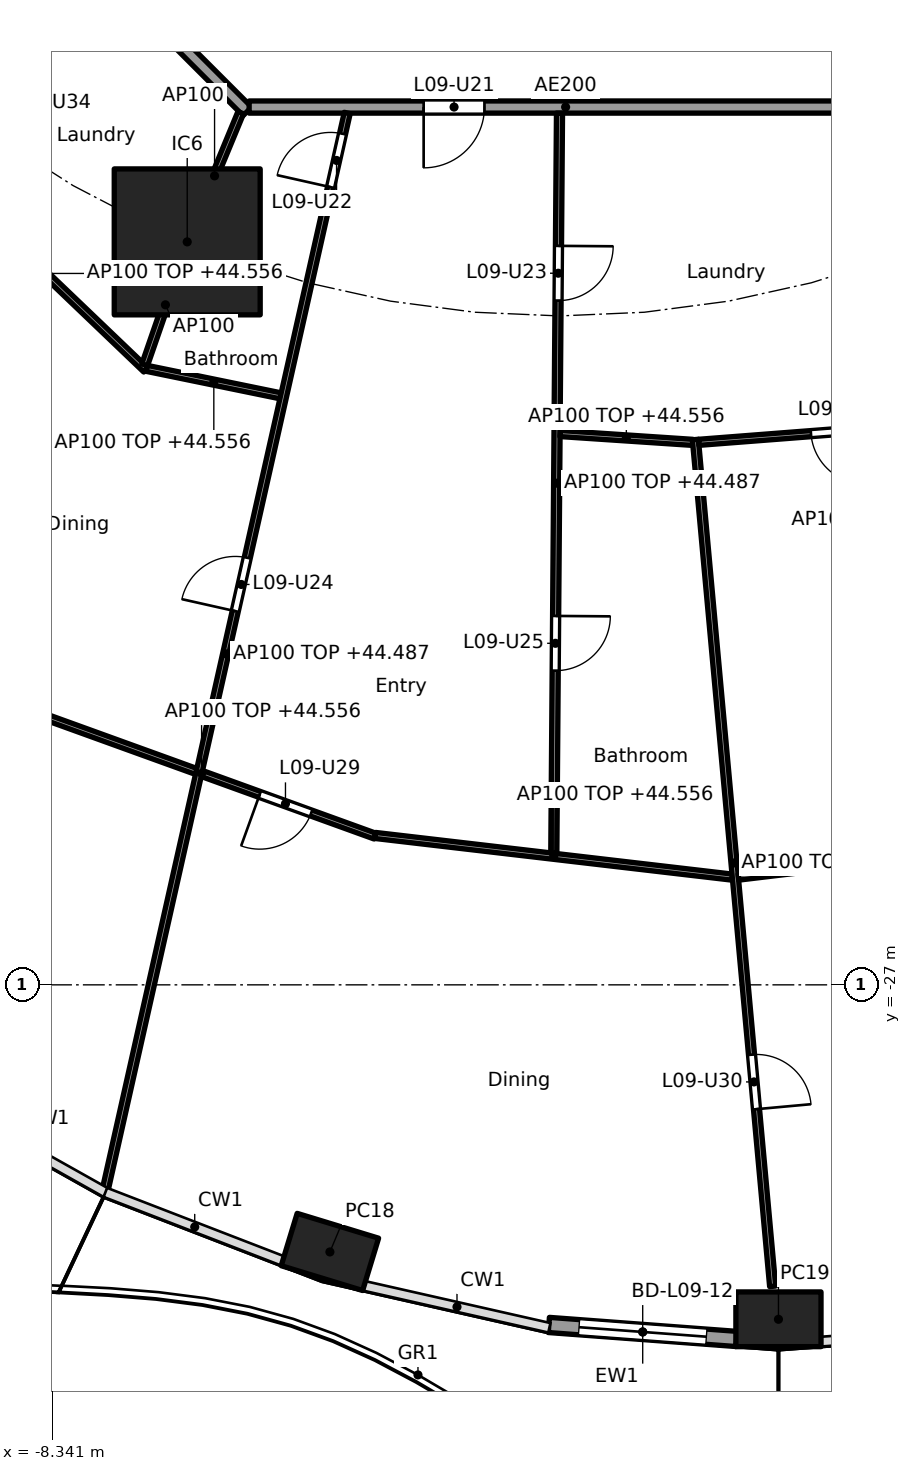
"""IFC4 building model, lengths in metres.
Left out: names, types, materials, properties, quantities, classifications, styles, units other than length and angle.
Written with IfcOpenShell. Run it as: python <this file> out.ifc"""

import sys

from ifc_helpers import new_model, si_unit, direction, frame, frame_2d, origin, origin_2d, place, context, subcontext, project, spatial, rectangle, hollow_rectangle, extrude, element, fill, save


model = new_model("IFC4")
c1 = context("Model", 3, precision=1e-05, world=origin(), true_north=direction((0.0, 1.0)))
c2 = subcontext(c1, "Body", "Model", "MODEL_VIEW")
j1 = project(units=[si_unit("LENGTHUNIT", "METRE"), si_unit("PLANEANGLEUNIT", "RADIAN")], contexts=[c1])
p1 = place(None, origin())
s1 = spatial("IfcSite", under=j1, at=p1, CompositionType="ELEMENT")
p2 = place(p1, origin())
s2 = spatial("IfcBuilding", under=s1, at=p2, CompositionType="ELEMENT")
p3 = place(p2, frame((0.0, 0.0, 41.8)))
s3 = spatial("IfcBuildingStorey", under=s2, at=p3, CompositionType="ELEMENT", Elevation=41.8)
for number, where, z_axis, x_axis in (
    (1, (-3.776, -31.393, 0.0), (0.0, 0.0, 1.0), (0.957, -0.292, 0.0)),
    (2, (3.6, -32.5, 0.0), (0.0, 0.0, 1.0), (1.0, 0.0, 0.0)),
):
    element("IfcColumn", number, at=place(p3, frame(where, z_axis=z_axis, x_axis=x_axis)), inside=s3, PredefinedType="COLUMN", context=c2, shape_type="SweptSolid", body=[
        extrude(hollow_rectangle(XDim=1.4, YDim=0.9, WallThickness=0.05, at=origin_2d()), origin(), (0.0, 0.0, 1.0), 3.7),
    ])
p4 = place(p3, frame((-6.123, -14.782, 0.0), z_axis=(0.0, 0.0, 1.0), x_axis=(1.0, 0.0, 0.0)))
e3 = element("IfcColumn", 3, at=p4, inside=s3, PredefinedType="COLUMN", context=c2, shape_type="SweptSolid", body=[
    extrude(rectangle(XDim=2.4, YDim=2.4, at=origin_2d()), origin(), (0.0, 0.0, 1.0), 3.7),
])
p5 = place(p3, frame((2.911, -32.823, 0.0), z_axis=(0.0, 0.0, 1.0), x_axis=(-0.997230834878, 0.074368420505, 0.0)))
e4 = element("IfcWall", 4, at=p5, inside=s3, PredefinedType="SOLIDWALL", context=c2, shape_type="SweptSolid", body=[
    extrude(rectangle(XDim=3.096, YDim=0.25, at=frame_2d((1.548, 0.0))), origin(), (0.0, 0.0, 1.0), 3.44),
])
p6 = place(p5, frame((0.498, 0.0, 0.0)))
e5 = element("IfcOpeningElement", 5, at=p6, cuts=e4, PredefinedType="OPENING", context=c2, shape_type="SweptSolid", body=[
    extrude(rectangle(XDim=2.1, YDim=2.4, at=frame_2d((1.05, 1.2))), frame((0.0, 0.135, 0.0), z_axis=(0.0, -1.0, 0.0), x_axis=(1.0, 0.0, 0.0)), (0.0, 0.0, 1.0), 0.27),
])
p7 = place(p3, frame((-12.635, -5.134, 0.0), z_axis=(0.0, 0.0, 1.0), x_axis=(0.707106781187, -0.707106781187, 0.0)))
e6 = element("IfcWall", 6, at=p7, inside=s3, PredefinedType="PARTITIONING", context=c2, shape_type="SweptSolid", body=[
    extrude(rectangle(XDim=10.609, YDim=0.2, at=frame_2d((5.305, 0.0))), origin(), (0.0, 0.0, 1.0), 3.44),
])
p8 = place(p3, frame((-5.104, -12.565, 0.0), z_axis=(0.0, 0.0, 1.0), x_axis=(1.0, 0.0, 0.0)))
e7 = element("IfcWall", 7, at=p8, inside=s3, PredefinedType="PARTITIONING", context=c2, shape_type="SweptSolid", body=[
    extrude(rectangle(XDim=10.409, YDim=0.2, at=frame_2d((5.205, 0.0))), origin(), (0.0, 0.0, 1.0), 3.44),
])
p9 = place(p8, frame((2.87, 0.0, 0.0)))
e8 = element("IfcOpeningElement", 8, at=p9, cuts=e7, PredefinedType="OPENING", context=c2, shape_type="SweptSolid", body=[
    extrude(rectangle(XDim=1.0, YDim=2.1, at=frame_2d((0.5, 1.05))), frame((0.0, 0.11, 0.0), z_axis=(0.0, -1.0, 0.0), x_axis=(1.0, 0.0, 0.0)), (0.0, 0.0, 1.0), 0.22),
])
p10 = place(p3, frame((-7.715, -10.193, 0.0), z_axis=(0.0, 0.0, 1.0), x_axis=(-0.573126502256, -0.819466907454, 0.0)))
e9 = element("IfcWall", 9, at=p10, inside=s3, PredefinedType="PARTITIONING", context=c2, shape_type="SweptSolid", body=[
    extrude(rectangle(XDim=9.954, YDim=0.1, at=frame_2d((4.977, 0.0))), origin(), (0.0, 0.0, 1.0), 2.687),
])
p11 = place(p10, frame((6.631, 0.0, 0.0)))
e10 = element("IfcOpeningElement", 10, at=p11, cuts=e9, PredefinedType="OPENING", context=c2, shape_type="SweptSolid", body=[
    extrude(rectangle(XDim=0.9, YDim=2.1, at=frame_2d((0.45, 1.05))), frame((0.0, 0.06, 0.0), z_axis=(0.0, -1.0, 0.0), x_axis=(1.0, 0.0, 0.0)), (0.0, 0.0, 1.0), 0.12),
])
p12 = place(p10, frame((1.678, 0.0, 0.0)))
e11 = element("IfcOpeningElement", 11, at=p12, cuts=e9, PredefinedType="OPENING", context=c2, shape_type="SweptSolid", body=[
    extrude(rectangle(XDim=0.9, YDim=2.1, at=frame_2d((0.45, 1.05))), frame((0.0, 0.06, 0.0), z_axis=(0.0, -1.0, 0.0), x_axis=(1.0, 0.0, 0.0)), (0.0, 0.0, 1.0), 0.12),
])
p13 = place(p3, frame((-10.119, -13.716, 0.0), z_axis=(0.0, 0.0, 1.0), x_axis=(0.722763212502, -0.69109575216, 0.0)))
e12 = element("IfcWall", 12, at=p13, inside=s3, PredefinedType="PARTITIONING", context=c2, shape_type="SweptSolid", body=[
    extrude(rectangle(XDim=4.587, YDim=0.1, at=frame_2d((2.293, 0.0))), origin(), (0.0, 0.0, 1.0), 2.756),
])
p14 = place(p13, frame((0.938, 0.0, 0.0)))
e13 = element("IfcOpeningElement", 13, at=p14, cuts=e12, PredefinedType="OPENING", context=c2, shape_type="SweptSolid", body=[
    extrude(rectangle(XDim=0.9, YDim=2.1, at=frame_2d((0.45, 1.05))), frame((0.0, 0.06, 0.0), z_axis=(0.0, -1.0, 0.0), x_axis=(1.0, 0.0, 0.0)), (0.0, 0.0, 1.0), 0.12),
])
p15 = place(p3, frame((-5.243, -12.657, 0.0), z_axis=(0.0, 0.0, 1.0), x_axis=(-0.382719158442, -0.923864733477, 0.0)))
e14 = element("IfcWall", 14, at=p15, inside=s3, PredefinedType="PARTITIONING", context=c2, shape_type="SweptSolid", body=[
    extrude(rectangle(XDim=2.25, YDim=0.1, at=frame_2d((1.125, 0.0))), origin(), (0.0, 0.0, 1.0), 3.44),
])
p16 = place(p3, frame((-6.139, -14.83, 0.0), z_axis=(0.0, 0.0, 1.0), x_axis=(-0.327246993321, -0.944938836837, 0.0)))
e15 = element("IfcWall", 15, at=p16, inside=s3, PredefinedType="PARTITIONING", context=c2, shape_type="SweptSolid", body=[
    extrude(rectangle(XDim=2.09, YDim=0.1, at=frame_2d((1.045, 0.0))), origin(), (0.0, 0.0, 1.0), 3.44),
])
p17 = place(p3, frame((-6.791, -16.862, 0.0), z_axis=(0.0, 0.0, 1.0), x_axis=(0.979581941859, -0.201045316246, 0.0)))
e16 = element("IfcWall", 16, at=p17, inside=s3, PredefinedType="PARTITIONING", context=c2, shape_type="SweptSolid", body=[
    extrude(rectangle(XDim=2.256, YDim=0.1, at=frame_2d((1.128, 0.0))), origin(), (0.0, 0.0, 1.0), 2.756),
])
p18 = place(p3, frame((-8.739, -22.491, 0.0), z_axis=(0.0, 0.0, 1.0), x_axis=(0.940401691072, -0.340065669288, 0.0)))
e17 = element("IfcWall", 17, at=p18, inside=s3, PredefinedType="PARTITIONING", context=c2, shape_type="SweptSolid", body=[
    extrude(rectangle(XDim=6.067, YDim=0.1, at=frame_2d((3.034, 0.0))), origin(), (0.0, 0.0, 1.0), 2.756),
])
p19 = place(p18, frame((4.05, 0.0, 0.0)))
e18 = element("IfcOpeningElement", 18, at=p19, cuts=e17, PredefinedType="OPENING", context=c2, shape_type="SweptSolid", body=[
    extrude(rectangle(XDim=0.9, YDim=2.1, at=frame_2d((0.45, 1.05))), frame((0.0, 0.06, 0.0), z_axis=(0.0, -1.0, 0.0), x_axis=(1.0, 0.0, 0.0)), (0.0, 0.0, 1.0), 0.12),
])
p20 = place(p3, frame((-3.492, -12.662, 0.0), z_axis=(0.0, 0.0, 1.0), x_axis=(-0.219268088006, -0.975664648115, 0.0)))
e19 = element("IfcWall", 19, at=p20, inside=s3, PredefinedType="PARTITIONING", context=c2, shape_type="SweptSolid", body=[
    extrude(rectangle(XDim=18.23, YDim=0.1, at=frame_2d((9.115, 0.0))), origin(), (0.0, 0.0, 1.0), 2.687),
])
p21 = place(p20, frame((0.35, 0.0, 0.0)))
e20 = element("IfcOpeningElement", 20, at=p21, cuts=e19, PredefinedType="OPENING", context=c2, shape_type="SweptSolid", body=[
    extrude(rectangle(XDim=0.9, YDim=2.1, at=frame_2d((0.45, 1.05))), frame((0.0, 0.06, 0.0), z_axis=(0.0, -1.0, 0.0), x_axis=(1.0, 0.0, 0.0)), (0.0, 0.0, 1.0), 0.12),
])
p22 = place(p20, frame((7.497, 0.0, 0.0)))
e21 = element("IfcOpeningElement", 21, at=p22, cuts=e19, PredefinedType="OPENING", context=c2, shape_type="SweptSolid", body=[
    extrude(rectangle(XDim=0.9, YDim=2.1, at=frame_2d((0.45, 1.05))), frame((0.0, 0.06, 0.0), z_axis=(0.0, -1.0, 0.0), x_axis=(1.0, 0.0, 0.0)), (0.0, 0.0, 1.0), 0.12),
])
p23 = place(p3, frame((-3.031, -24.543, 0.0), z_axis=(0.0, 0.0, 1.0), x_axis=(0.993255612046, -0.115945198862, 0.0)))
e22 = element("IfcWall", 22, at=p23, inside=s3, PredefinedType="PARTITIONING", context=c2, shape_type="SweptSolid", body=[
    extrude(rectangle(XDim=5.913, YDim=0.1, at=frame_2d((2.956, 0.0))), origin(), (0.0, 0.0, 1.0), 2.756),
])
p24 = place(p3, frame((-0.001, -12.665, 0.0), z_axis=(0.0, 0.0, 1.0), x_axis=(-0.007702417287, -0.999970335944, 0.0)))
e23 = element("IfcWall", 23, at=p24, inside=s3, PredefinedType="PARTITIONING", context=c2, shape_type="SweptSolid", body=[
    extrude(rectangle(XDim=12.171, YDim=0.1, at=frame_2d((6.086, 0.0))), origin(), (0.0, 0.0, 1.0), 2.687),
])
p25 = place(p24, frame((2.183, 0.0, 0.0)))
e24 = element("IfcOpeningElement", 24, at=p25, cuts=e23, PredefinedType="OPENING", context=c2, shape_type="SweptSolid", body=[
    extrude(rectangle(XDim=0.9, YDim=2.1, at=frame_2d((0.45, 1.05))), frame((0.0, 0.06, 0.0), z_axis=(0.0, -1.0, 0.0), x_axis=(1.0, 0.0, 0.0)), (0.0, 0.0, 1.0), 0.12),
])
p26 = place(p24, frame((8.269, 0.0, 0.0)))
e25 = element("IfcOpeningElement", 25, at=p26, cuts=e23, PredefinedType="OPENING", context=c2, shape_type="SweptSolid", body=[
    extrude(rectangle(XDim=0.9, YDim=2.1, at=frame_2d((0.45, 1.05))), frame((0.0, 0.06, 0.0), z_axis=(0.0, -1.0, 0.0), x_axis=(1.0, 0.0, 0.0)), (0.0, 0.0, 1.0), 0.12),
])
p27 = place(p3, frame((0.009, -17.934, 0.0), z_axis=(0.0, 0.0, 1.0), x_axis=(0.997794542617, -0.066378089183, 0.0)))
e26 = element("IfcWall", 26, at=p27, inside=s3, PredefinedType="PARTITIONING", context=c2, shape_type="SweptSolid", body=[
    extrude(rectangle(XDim=2.185, YDim=0.1, at=frame_2d((1.092, 0.0))), origin(), (0.0, 0.0, 1.0), 2.756),
])
p28 = place(p3, frame((2.234, -18.032, 0.0), z_axis=(0.0, 0.0, 1.0), x_axis=(0.090891502968, -0.995860800859, 0.0)))
e27 = element("IfcWall", 27, at=p28, inside=s3, PredefinedType="PARTITIONING", context=c2, shape_type="SweptSolid", body=[
    extrude(rectangle(XDim=13.984, YDim=0.1, at=frame_2d((6.992, 0.0))), origin(), (0.0, 0.0, 1.0), 2.756),
])
p29 = place(p28, frame((10.158, 0.0, 0.0)))
e28 = element("IfcOpeningElement", 28, at=p29, cuts=e27, PredefinedType="OPENING", context=c2, shape_type="SweptSolid", body=[
    extrude(rectangle(XDim=0.9, YDim=2.1, at=frame_2d((0.45, 1.05))), frame((0.0, 0.06, 0.0), z_axis=(0.0, -1.0, 0.0), x_axis=(1.0, 0.0, 0.0)), (0.0, 0.0, 1.0), 0.12),
])
p30 = place(p3, frame((2.288, -18.078, 0.0), z_axis=(0.0, 0.0, 1.0), x_axis=(0.99701850123, 0.077162868047, 0.0)))
e29 = element("IfcWall", 29, at=p30, inside=s3, PredefinedType="PARTITIONING", context=c2, shape_type="SweptSolid", body=[
    extrude(rectangle(XDim=4.604, YDim=0.1, at=frame_2d((2.302, 0.0))), origin(), (0.0, 0.0, 1.0), 2.756),
])
p31 = place(p30, frame((1.852, 0.0, 0.0)))
e30 = element("IfcOpeningElement", 30, at=p31, cuts=e29, PredefinedType="OPENING", context=c2, shape_type="SweptSolid", body=[
    extrude(rectangle(XDim=0.9, YDim=2.1, at=frame_2d((0.45, 1.05))), frame((0.0, 0.06, 0.0), z_axis=(0.0, -1.0, 0.0), x_axis=(1.0, 0.0, 0.0)), (0.0, 0.0, 1.0), 0.12),
])
p32 = place(p3, frame((2.941, -25.229, 0.0), z_axis=(0.0, 0.0, 1.0), x_axis=(0.992834127896, 0.119500604542, 0.0)))
e31 = element("IfcWall", 31, at=p32, inside=s3, PredefinedType="PARTITIONING", context=c2, shape_type="SweptSolid", body=[
    extrude(rectangle(XDim=5.959, YDim=0.1, at=frame_2d((2.98, 0.0))), origin(), (0.0, 0.0, 1.0), 2.756),
])
p33 = place(p6, origin())
e32 = element("IfcDoor", 32, at=p33, inside=s3, OperationType="SLIDING_TO_LEFT", PredefinedType="DOOR", context=c2, shape_type="SweptSolid", body=[
    extrude(rectangle(XDim=2.1, YDim=2.4, at=frame_2d((1.05, 1.2))), frame((0.0, 0.025, 0.0), z_axis=(0.0, -1.0, 0.0), x_axis=(1.0, 0.0, 0.0)), (0.0, 0.0, 1.0), 0.05),
])
fill(e5, e32)
p34 = place(p9, frame((1.0, 0.0, 0.0), x_axis=(-1.0, 0.0, 0.0)))
e33 = element("IfcDoor", 33, at=p34, inside=s3, OperationType="SINGLE_SWING_RIGHT", PredefinedType="DOOR", context=c2, shape_type="SweptSolid", body=[
    extrude(rectangle(XDim=1.0, YDim=2.1, at=frame_2d((0.5, 1.05))), frame((0.0, 0.025, 0.0), z_axis=(0.0, -1.0, 0.0), x_axis=(1.0, 0.0, 0.0)), (0.0, 0.0, 1.0), 0.05),
])
fill(e8, e33)
p35 = place(p21, frame((0.9, 0.0, 0.0), x_axis=(-1.0, 0.0, 0.0)))
e34 = element("IfcDoor", 34, at=p35, inside=s3, OperationType="SINGLE_SWING_LEFT", PredefinedType="DOOR", context=c2, shape_type="SweptSolid", body=[
    extrude(rectangle(XDim=0.9, YDim=2.1, at=frame_2d((0.45, 1.05))), frame((0.0, 0.025, 0.0), z_axis=(0.0, -1.0, 0.0), x_axis=(1.0, 0.0, 0.0)), (0.0, 0.0, 1.0), 0.05),
])
fill(e20, e34)
p36 = place(p25, origin())
e35 = element("IfcDoor", 35, at=p36, inside=s3, OperationType="SINGLE_SWING_LEFT", PredefinedType="DOOR", context=c2, shape_type="SweptSolid", body=[
    extrude(rectangle(XDim=0.9, YDim=2.1, at=frame_2d((0.45, 1.05))), frame((0.0, 0.025, 0.0), z_axis=(0.0, -1.0, 0.0), x_axis=(1.0, 0.0, 0.0)), (0.0, 0.0, 1.0), 0.05),
])
fill(e24, e35)
p37 = place(p22, frame((0.9, 0.0, 0.0), x_axis=(-1.0, 0.0, 0.0)))
e36 = element("IfcDoor", 36, at=p37, inside=s3, OperationType="SINGLE_SWING_LEFT", PredefinedType="DOOR", context=c2, shape_type="SweptSolid", body=[
    extrude(rectangle(XDim=0.9, YDim=2.1, at=frame_2d((0.45, 1.05))), frame((0.0, 0.025, 0.0), z_axis=(0.0, -1.0, 0.0), x_axis=(1.0, 0.0, 0.0)), (0.0, 0.0, 1.0), 0.05),
])
fill(e21, e36)
p38 = place(p26, origin())
e37 = element("IfcDoor", 37, at=p38, inside=s3, OperationType="SINGLE_SWING_LEFT", PredefinedType="DOOR", context=c2, shape_type="SweptSolid", body=[
    extrude(rectangle(XDim=0.9, YDim=2.1, at=frame_2d((0.45, 1.05))), frame((0.0, 0.025, 0.0), z_axis=(0.0, -1.0, 0.0), x_axis=(1.0, 0.0, 0.0)), (0.0, 0.0, 1.0), 0.05),
])
fill(e25, e37)
p39 = place(p31, frame((0.9, 0.0, 0.0), x_axis=(-1.0, 0.0, 0.0)))
e38 = element("IfcDoor", 38, at=p39, inside=s3, OperationType="SINGLE_SWING_LEFT", PredefinedType="DOOR", context=c2, shape_type="SweptSolid", body=[
    extrude(rectangle(XDim=0.9, YDim=2.1, at=frame_2d((0.45, 1.05))), frame((0.0, 0.025, 0.0), z_axis=(0.0, -1.0, 0.0), x_axis=(1.0, 0.0, 0.0)), (0.0, 0.0, 1.0), 0.05),
])
fill(e30, e38)
p40 = place(p19, frame((0.9, 0.0, 0.0), x_axis=(-1.0, 0.0, 0.0)))
e39 = element("IfcDoor", 39, at=p40, inside=s3, OperationType="SINGLE_SWING_RIGHT", PredefinedType="DOOR", context=c2, shape_type="SweptSolid", body=[
    extrude(rectangle(XDim=0.9, YDim=2.1, at=frame_2d((0.45, 1.05))), frame((0.0, 0.025, 0.0), z_axis=(0.0, -1.0, 0.0), x_axis=(1.0, 0.0, 0.0)), (0.0, 0.0, 1.0), 0.05),
])
fill(e18, e39)
p41 = place(p29, origin())
e40 = element("IfcDoor", 40, at=p41, inside=s3, OperationType="SINGLE_SWING_RIGHT", PredefinedType="DOOR", context=c2, shape_type="SweptSolid", body=[
    extrude(rectangle(XDim=0.9, YDim=2.1, at=frame_2d((0.45, 1.05))), frame((0.0, 0.025, 0.0), z_axis=(0.0, -1.0, 0.0), x_axis=(1.0, 0.0, 0.0)), (0.0, 0.0, 1.0), 0.05),
])
fill(e28, e40)
save(model, sys.argv[1])
